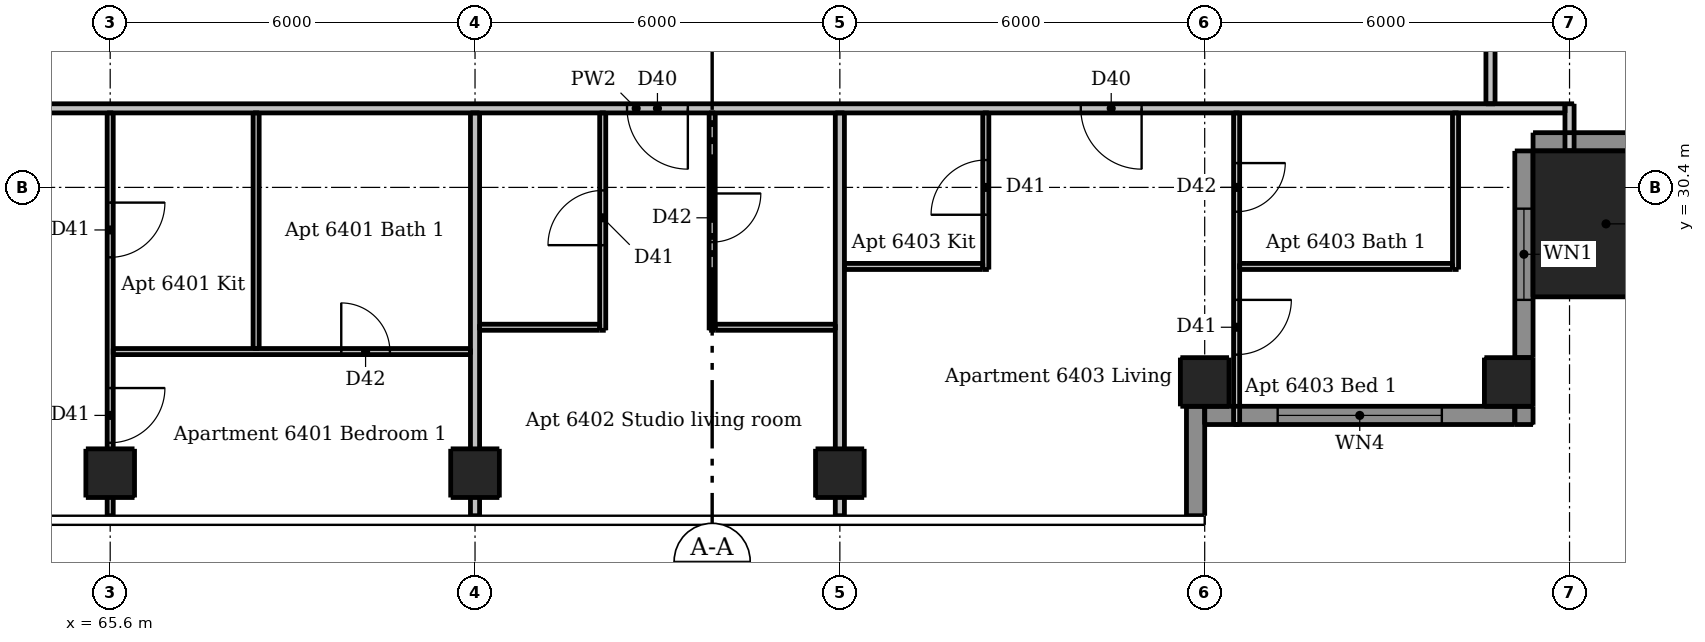
"""IFC4 building model, lengths in metres.
Left out: names, types, materials, properties, quantities, classifications, styles, units other than length and angle.
Written with IfcOpenShell. Run it as: python <this file> out.ifc"""

import sys

from ifc_helpers import new_model, si_unit, direction, frame, frame_2d, origin, origin_2d, place, context, subcontext, project, spatial, rectangle, extrude, element, fill, save


model = new_model("IFC4")
c1 = context("Model", 3, precision=1e-05, world=origin(), true_north=direction((0.0, 1.0)))
c2 = subcontext(c1, "Body", "Model", "MODEL_VIEW")
j1 = project(units=[si_unit("LENGTHUNIT", "METRE"), si_unit("PLANEANGLEUNIT", "RADIAN")], contexts=[c1])
p1 = place(None, origin())
s1 = spatial("IfcSite", under=j1, at=p1, CompositionType="ELEMENT")
p2 = place(p1, origin())
s2 = spatial("IfcBuilding", under=s1, at=p2, CompositionType="ELEMENT")
p3 = place(p2, frame((0.0, 0.0, 242.2)))
s3 = spatial("IfcBuildingStorey", under=s2, at=p3, CompositionType="ELEMENT", Elevation=242.2)
for number, where, z_axis, x_axis in (
    (1, (65.6, 25.7, 0.0), (0.0, 0.0, 1.0), (1.0, 0.0, 0.0)),
    (2, (71.6, 25.7, 0.0), (0.0, 0.0, 1.0), (1.0, 0.0, 0.0)),
    (3, (77.6, 25.7, 0.0), (0.0, 0.0, 1.0), (1.0, 0.0, 0.0)),
    (4, (83.6, 27.2, 0.0), (0.0, 0.0, 1.0), (1.0, 0.0, 0.0)),
    (5, (88.6, 27.2, 0.0), (0.0, 0.0, 1.0), (1.0, 0.0, 0.0)),
):
    element("IfcColumn", number, at=place(p3, frame(where, z_axis=z_axis, x_axis=x_axis)), inside=s3, PredefinedType="COLUMN", context=c2, shape_type="SweptSolid", body=[
        extrude(rectangle(XDim=0.8, YDim=0.8, at=origin_2d()), origin(), (0.0, 0.0, 1.0), 3.05),
    ])
p4 = place(p3, frame((90.2, 29.8, 0.0), z_axis=(0.0, 0.0, 1.0), x_axis=(1.0, 0.0, 0.0)))
e6 = element("IfcColumn", 6, at=p4, inside=s3, PredefinedType="COLUMN", context=c2, shape_type="SweptSolid", body=[
    extrude(rectangle(XDim=2.4, YDim=2.4, at=origin_2d()), origin(), (0.0, 0.0, 1.0), 3.3),
])
p5 = place(p3, frame((83.45, 25.0, 0.0), z_axis=(0.0, 0.0, 1.0), x_axis=(0.0, 1.0, 0.0)))
e7 = element("IfcWall", 7, at=p5, inside=s3, PredefinedType="SOLIDWALL", context=c2, shape_type="SweptSolid", body=[
    extrude(rectangle(XDim=1.8, YDim=0.3, at=frame_2d((0.9, 0.0))), origin(), (0.0, 0.0, 1.0), 3.05),
])
p6 = place(p3, frame((88.85, 26.5, 0.0), z_axis=(0.0, 0.0, 1.0), x_axis=(0.0, 1.0, 0.0)))
e8 = element("IfcWall", 8, at=p6, inside=s3, PredefinedType="SOLIDWALL", context=c2, shape_type="SweptSolid", body=[
    extrude(rectangle(XDim=0.3, YDim=0.3, at=frame_2d((0.15, 0.0))), origin(), (0.0, 0.0, 1.0), 3.05),
])
p7 = place(p3, frame((88.85, 27.6, 0.0), z_axis=(0.0, 0.0, 1.0), x_axis=(0.0, 1.0, 0.0)))
e9 = element("IfcWall", 9, at=p7, inside=s3, PredefinedType="SOLIDWALL", context=c2, shape_type="SweptSolid", body=[
    extrude(rectangle(XDim=3.4, YDim=0.3, at=frame_2d((1.7, 0.0))), origin(), (0.0, 0.0, 1.0), 3.05),
])
p8 = place(p7, frame((0.95, 0.0, 0.9)))
e10 = element("IfcOpeningElement", 10, at=p8, cuts=e9, PredefinedType="OPENING", context=c2, shape_type="SweptSolid", body=[
    extrude(rectangle(XDim=1.5, YDim=1.5, at=frame_2d((0.75, 0.75))), frame((0.0, 0.16, 0.0), z_axis=(0.0, -1.0, 0.0), x_axis=(1.0, 0.0, 0.0)), (0.0, 0.0, 1.0), 0.32),
])
p9 = place(p3, frame((89.0, 31.15, 0.0), z_axis=(0.0, 0.0, 1.0), x_axis=(1.0, 0.0, 0.0)))
e11 = element("IfcWall", 11, at=p9, inside=s3, PredefinedType="SOLIDWALL", context=c2, shape_type="SweptSolid", body=[
    extrude(rectangle(XDim=3.4, YDim=0.3, at=frame_2d((1.7, 0.0))), origin(), (0.0, 0.0, 1.0), 3.05),
])
p10 = place(p3, frame((83.6, 26.65, 0.0), z_axis=(0.0, 0.0, 1.0), x_axis=(1.0, 0.0, 0.0)))
e12 = element("IfcWall", 12, at=p10, inside=s3, PredefinedType="SOLIDWALL", context=c2, shape_type="SweptSolid", body=[
    extrude(rectangle(XDim=5.1, YDim=0.3, at=frame_2d((2.55, 0.0))), origin(), (0.0, 0.0, 1.0), 3.05),
])
p11 = place(p10, frame((1.2, 0.0, 0.15)))
e13 = element("IfcOpeningElement", 13, at=p11, cuts=e12, PredefinedType="OPENING", context=c2, shape_type="SweptSolid", body=[
    extrude(rectangle(XDim=2.7, YDim=2.1, at=frame_2d((1.35, 1.05))), frame((0.0, 0.16, 0.0), z_axis=(0.0, -1.0, 0.0), x_axis=(1.0, 0.0, 0.0)), (0.0, 0.0, 1.0), 0.32),
])
p12 = place(p3, frame((65.6, 31.625, 0.0), z_axis=(0.0, 0.0, 1.0), x_axis=(0.0, -1.0, 0.0)))
e14 = element("IfcWall", 14, at=p12, inside=s3, PredefinedType="PARTITIONING", context=c2, shape_type="SweptSolid", body=[
    extrude(rectangle(XDim=6.625, YDim=0.1, at=frame_2d((3.312, 0.0))), origin(), (0.0, 0.0, 1.0), 2.59),
])
p13 = place(p12, frame((1.475, 0.0, 0.0)))
e15 = element("IfcOpeningElement", 15, at=p13, cuts=e14, PredefinedType="OPENING", context=c2, shape_type="SweptSolid", body=[
    extrude(rectangle(XDim=0.9, YDim=2.1, at=frame_2d((0.45, 1.05))), frame((0.0, 0.06, 0.0), z_axis=(0.0, -1.0, 0.0), x_axis=(1.0, 0.0, 0.0)), (0.0, 0.0, 1.0), 0.12),
])
p14 = place(p12, frame((4.525, 0.0, 0.0)))
e16 = element("IfcOpeningElement", 16, at=p14, cuts=e14, PredefinedType="OPENING", context=c2, shape_type="SweptSolid", body=[
    extrude(rectangle(XDim=0.9, YDim=2.1, at=frame_2d((0.45, 1.05))), frame((0.0, 0.06, 0.0), z_axis=(0.0, -1.0, 0.0), x_axis=(1.0, 0.0, 0.0)), (0.0, 0.0, 1.0), 0.12),
])
p15 = place(p3, frame((68.0, 27.75, 0.0), z_axis=(0.0, 0.0, 1.0), x_axis=(0.0, 1.0, 0.0)))
e17 = element("IfcWall", 17, at=p15, inside=s3, PredefinedType="PARTITIONING", context=c2, shape_type="SweptSolid", body=[
    extrude(rectangle(XDim=3.875, YDim=0.1, at=frame_2d((1.938, 0.0))), origin(), (0.0, 0.0, 1.0), 3.05),
])
p16 = place(p3, frame((73.7, 28.05, 0.0), z_axis=(0.0, 0.0, 1.0), x_axis=(0.0, 1.0, 0.0)))
e18 = element("IfcWall", 18, at=p16, inside=s3, PredefinedType="PARTITIONING", context=c2, shape_type="SweptSolid", body=[
    extrude(rectangle(XDim=3.575, YDim=0.1, at=frame_2d((1.788, 0.0))), origin(), (0.0, 0.0, 1.0), 3.05),
])
p17 = place(p16, frame((1.4, 0.0, 0.0)))
e19 = element("IfcOpeningElement", 19, at=p17, cuts=e18, PredefinedType="OPENING", context=c2, shape_type="SweptSolid", body=[
    extrude(rectangle(XDim=0.9, YDim=2.1, at=frame_2d((0.45, 1.05))), frame((0.0, 0.06, 0.0), z_axis=(0.0, -1.0, 0.0), x_axis=(1.0, 0.0, 0.0)), (0.0, 0.0, 1.0), 0.12),
])
p18 = place(p3, frame((75.5, 31.625, 0.0), z_axis=(0.0, 0.0, 1.0), x_axis=(0.0, -1.0, 0.0)))
e20 = element("IfcWall", 20, at=p18, inside=s3, PredefinedType="PARTITIONING", context=c2, shape_type="SweptSolid", body=[
    extrude(rectangle(XDim=3.575, YDim=0.1, at=frame_2d((1.788, 0.0))), origin(), (0.0, 0.0, 1.0), 3.05),
])
p19 = place(p18, frame((1.325, 0.0, 0.0)))
e21 = element("IfcOpeningElement", 21, at=p19, cuts=e20, PredefinedType="OPENING", context=c2, shape_type="SweptSolid", body=[
    extrude(rectangle(XDim=0.8, YDim=2.1, at=frame_2d((0.4, 1.05))), frame((0.0, 0.06, 0.0), z_axis=(0.0, -1.0, 0.0), x_axis=(1.0, 0.0, 0.0)), (0.0, 0.0, 1.0), 0.12),
])
p20 = place(p3, frame((80.0, 29.05, 0.0), z_axis=(0.0, 0.0, 1.0), x_axis=(0.0, 1.0, 0.0)))
e22 = element("IfcWall", 22, at=p20, inside=s3, PredefinedType="PARTITIONING", context=c2, shape_type="SweptSolid", body=[
    extrude(rectangle(XDim=2.575, YDim=0.1, at=frame_2d((1.288, 0.0))), origin(), (0.0, 0.0, 1.0), 3.05),
])
p21 = place(p20, frame((0.9, 0.0, 0.0)))
e23 = element("IfcOpeningElement", 23, at=p21, cuts=e22, PredefinedType="OPENING", context=c2, shape_type="SweptSolid", body=[
    extrude(rectangle(XDim=0.9, YDim=2.1, at=frame_2d((0.45, 1.05))), frame((0.0, 0.06, 0.0), z_axis=(0.0, -1.0, 0.0), x_axis=(1.0, 0.0, 0.0)), (0.0, 0.0, 1.0), 0.12),
])
p22 = place(p3, frame((84.125, 31.625, 0.0), z_axis=(0.0, 0.0, 1.0), x_axis=(0.0, -1.0, 0.0)))
e24 = element("IfcWall", 24, at=p22, inside=s3, PredefinedType="PARTITIONING", context=c2, shape_type="SweptSolid", body=[
    extrude(rectangle(XDim=5.125, YDim=0.1, at=frame_2d((2.562, 0.0))), origin(), (0.0, 0.0, 1.0), 3.05),
])
p23 = place(p22, frame((3.075, 0.0, 0.0)))
e25 = element("IfcOpeningElement", 25, at=p23, cuts=e24, PredefinedType="OPENING", context=c2, shape_type="SweptSolid", body=[
    extrude(rectangle(XDim=0.9, YDim=2.1, at=frame_2d((0.45, 1.05))), frame((0.0, 0.06, 0.0), z_axis=(0.0, -1.0, 0.0), x_axis=(1.0, 0.0, 0.0)), (0.0, 0.0, 1.0), 0.12),
])
p24 = place(p22, frame((0.825, 0.0, 0.0)))
e26 = element("IfcOpeningElement", 26, at=p24, cuts=e24, PredefinedType="OPENING", context=c2, shape_type="SweptSolid", body=[
    extrude(rectangle(XDim=0.8, YDim=2.1, at=frame_2d((0.4, 1.05))), frame((0.0, 0.06, 0.0), z_axis=(0.0, -1.0, 0.0), x_axis=(1.0, 0.0, 0.0)), (0.0, 0.0, 1.0), 0.12),
])
p25 = place(p3, frame((87.725, 29.05, 0.0), z_axis=(0.0, 0.0, 1.0), x_axis=(0.0, 1.0, 0.0)))
e27 = element("IfcWall", 27, at=p25, inside=s3, PredefinedType="PARTITIONING", context=c2, shape_type="SweptSolid", body=[
    extrude(rectangle(XDim=2.575, YDim=0.1, at=frame_2d((1.288, 0.0))), origin(), (0.0, 0.0, 1.0), 3.05),
])
p26 = place(p3, frame((77.675, 29.1, 0.0), z_axis=(0.0, 0.0, 1.0), x_axis=(1.0, 0.0, 0.0)))
e28 = element("IfcWall", 28, at=p26, inside=s3, PredefinedType="PARTITIONING", context=c2, shape_type="SweptSolid", body=[
    extrude(rectangle(XDim=2.275, YDim=0.1, at=frame_2d((1.137, 0.0))), origin(), (0.0, 0.0, 1.0), 3.05),
])
p27 = place(p3, frame((84.175, 29.1, 0.0), z_axis=(0.0, 0.0, 1.0), x_axis=(1.0, 0.0, 0.0)))
e29 = element("IfcWall", 29, at=p27, inside=s3, PredefinedType="PARTITIONING", context=c2, shape_type="SweptSolid", body=[
    extrude(rectangle(XDim=3.5, YDim=0.1, at=frame_2d((1.75, 0.0))), origin(), (0.0, 0.0, 1.0), 3.05),
])
for number, where, z_axis, x_axis in (
    (30, (71.675, 28.1, 0.0), (0.0, 0.0, 1.0), (1.0, 0.0, 0.0)),
    (31, (75.55, 28.1, 0.0), (0.0, 0.0, 1.0), (1.0, 0.0, 0.0)),
):
    element("IfcWall", number, at=place(p3, frame(where, z_axis=z_axis, x_axis=x_axis)), inside=s3, PredefinedType="PARTITIONING", context=c2, shape_type="SweptSolid", body=[
        extrude(rectangle(XDim=1.975, YDim=0.1, at=frame_2d((0.987, 0.0))), origin(), (0.0, 0.0, 1.0), 3.05),
    ])
p28 = place(p3, frame((65.65, 27.7, 0.0), z_axis=(0.0, 0.0, 1.0), x_axis=(1.0, 0.0, 0.0)))
e32 = element("IfcWall", 32, at=p28, inside=s3, PredefinedType="PARTITIONING", context=c2, shape_type="SweptSolid", body=[
    extrude(rectangle(XDim=5.875, YDim=0.1, at=frame_2d((2.938, 0.0))), origin(), (0.0, 0.0, 1.0), 3.05),
])
p29 = place(p28, frame((3.75, 0.0, 0.0)))
e33 = element("IfcOpeningElement", 33, at=p29, cuts=e32, PredefinedType="OPENING", context=c2, shape_type="SweptSolid", body=[
    extrude(rectangle(XDim=0.8, YDim=2.1, at=frame_2d((0.4, 1.05))), frame((0.0, 0.06, 0.0), z_axis=(0.0, -1.0, 0.0), x_axis=(1.0, 0.0, 0.0)), (0.0, 0.0, 1.0), 0.12),
])
for number, where, z_axis, x_axis in (
    (34, (71.6, 25.0, 0.0), (0.0, 0.0, 1.0), (0.0, 1.0, 0.0)),
    (35, (77.6, 25.0, 0.0), (0.0, 0.0, 1.0), (0.0, 1.0, 0.0)),
):
    element("IfcWall", number, at=place(p3, frame(where, z_axis=z_axis, x_axis=x_axis)), inside=s3, PredefinedType="PARTITIONING", context=c2, shape_type="SweptSolid", body=[
        extrude(rectangle(XDim=6.625, YDim=0.15, at=frame_2d((3.312, 0.0))), origin(), (0.0, 0.0, 1.0), 2.59),
    ])
p30 = place(p3, frame((88.3, 61.175, 0.0), z_axis=(0.0, 0.0, 1.0), x_axis=(0.0, -1.0, 0.0)))
e36 = element("IfcWall", 36, at=p30, inside=s3, PredefinedType="PARTITIONING", context=c2, shape_type="SweptSolid", body=[
    extrude(rectangle(XDim=29.4, YDim=0.15, at=frame_2d((14.7, 0.0))), origin(), (0.0, 0.0, 1.0), 3.05),
])
p31 = place(p30, frame((26.625, 0.0, 0.0)))
e37 = element("IfcOpeningElement", 37, at=p31, cuts=e36, PredefinedType="OPENING", context=c2, shape_type="SweptSolid", body=[
    extrude(rectangle(XDim=1.0, YDim=2.1, at=frame_2d((0.5, 1.05))), frame((0.0, 0.085, 0.0), z_axis=(0.0, -1.0, 0.0), x_axis=(1.0, 0.0, 0.0)), (0.0, 0.0, 1.0), 0.17),
])
p32 = place(p30, frame((15.275, 0.0, 0.0)))
e38 = element("IfcOpeningElement", 38, at=p32, cuts=e36, PredefinedType="OPENING", context=c2, shape_type="SweptSolid", body=[
    extrude(rectangle(XDim=1.0, YDim=2.1, at=frame_2d((0.5, 1.05))), frame((0.0, 0.085, 0.0), z_axis=(0.0, -1.0, 0.0), x_axis=(1.0, 0.0, 0.0)), (0.0, 0.0, 1.0), 0.17),
])
p33 = place(p30, frame((9.275, 0.0, 0.0)))
e39 = element("IfcOpeningElement", 39, at=p33, cuts=e36, PredefinedType="OPENING", context=c2, shape_type="SweptSolid", body=[
    extrude(rectangle(XDim=1.0, YDim=2.1, at=frame_2d((0.5, 1.05))), frame((0.0, 0.085, 0.0), z_axis=(0.0, -1.0, 0.0), x_axis=(1.0, 0.0, 0.0)), (0.0, 0.0, 1.0), 0.17),
])
p34 = place(p30, frame((3.275, 0.0, 0.0)))
e40 = element("IfcOpeningElement", 40, at=p34, cuts=e36, PredefinedType="OPENING", context=c2, shape_type="SweptSolid", body=[
    extrude(rectangle(XDim=1.0, YDim=2.1, at=frame_2d((0.5, 1.05))), frame((0.0, 0.085, 0.0), z_axis=(0.0, -1.0, 0.0), x_axis=(1.0, 0.0, 0.0)), (0.0, 0.0, 1.0), 0.17),
])
p35 = place(p3, frame((89.6, 31.0, 0.0), z_axis=(0.0, 0.0, 1.0), x_axis=(0.0, 1.0, 0.0)))
e41 = element("IfcWall", 41, at=p35, inside=s3, PredefinedType="PARTITIONING", context=c2, shape_type="SweptSolid", body=[
    extrude(rectangle(XDim=0.775, YDim=0.15, at=frame_2d((0.387, 0.0))), origin(), (0.0, 0.0, 1.0), 3.05),
])
p36 = place(p3, frame((89.525, 31.7, 0.0), z_axis=(0.0, 0.0, 1.0), x_axis=(-1.0, 0.0, 0.0)))
e42 = element("IfcWall", 42, at=p36, inside=s3, PredefinedType="PARTITIONING", context=c2, shape_type="SweptSolid", body=[
    extrude(rectangle(XDim=30.55, YDim=0.15, at=frame_2d((15.275, 0.0))), origin(), (0.0, 0.0, 1.0), 3.05),
])
p37 = place(p36, frame((26.775, 0.0, 0.0)))
e43 = element("IfcOpeningElement", 43, at=p37, cuts=e42, PredefinedType="OPENING", context=c2, shape_type="SweptSolid", body=[
    extrude(rectangle(XDim=1.0, YDim=2.1, at=frame_2d((0.5, 1.05))), frame((0.0, 0.085, 0.0), z_axis=(0.0, -1.0, 0.0), x_axis=(1.0, 0.0, 0.0)), (0.0, 0.0, 1.0), 0.17),
])
p38 = place(p36, frame((14.425, 0.0, 0.0)))
e44 = element("IfcOpeningElement", 44, at=p38, cuts=e42, PredefinedType="OPENING", context=c2, shape_type="SweptSolid", body=[
    extrude(rectangle(XDim=1.0, YDim=2.1, at=frame_2d((0.5, 1.05))), frame((0.0, 0.085, 0.0), z_axis=(0.0, -1.0, 0.0), x_axis=(1.0, 0.0, 0.0)), (0.0, 0.0, 1.0), 0.17),
])
p39 = place(p36, frame((6.962, 0.0, 0.0)))
e45 = element("IfcOpeningElement", 45, at=p39, cuts=e42, PredefinedType="OPENING", context=c2, shape_type="SweptSolid", body=[
    extrude(rectangle(XDim=1.0, YDim=2.1, at=frame_2d((0.5, 1.05))), frame((0.0, 0.085, 0.0), z_axis=(0.0, -1.0, 0.0), x_axis=(1.0, 0.0, 0.0)), (0.0, 0.0, 1.0), 0.17),
])
p40 = place(p8, origin())
e46 = element("IfcWindow", 46, at=p40, inside=s3, PartitioningType="DOUBLE_PANEL_VERTICAL", PredefinedType="WINDOW", context=c2, shape_type="SweptSolid", body=[
    extrude(rectangle(XDim=1.5, YDim=1.5, at=frame_2d((0.75, 0.75))), frame((0.0, 0.03, 0.0), z_axis=(0.0, -1.0, 0.0), x_axis=(1.0, 0.0, 0.0)), (0.0, 0.0, 1.0), 0.06),
])
fill(e10, e46)
p41 = place(p11, origin())
e47 = element("IfcWindow", 47, at=p41, inside=s3, PartitioningType="DOUBLE_PANEL_VERTICAL", PredefinedType="WINDOW", context=c2, shape_type="SweptSolid", body=[
    extrude(rectangle(XDim=2.7, YDim=2.1, at=frame_2d((1.35, 1.05))), frame((0.0, 0.03, 0.0), z_axis=(0.0, -1.0, 0.0), x_axis=(1.0, 0.0, 0.0)), (0.0, 0.0, 1.0), 0.06),
])
fill(e13, e47)
p42 = place(p13, origin())
e48 = element("IfcDoor", 48, at=p42, inside=s3, OperationType="SINGLE_SWING_LEFT", PredefinedType="DOOR", context=c2, shape_type="SweptSolid", body=[
    extrude(rectangle(XDim=0.9, YDim=2.1, at=frame_2d((0.45, 1.05))), frame((0.0, 0.025, 0.0), z_axis=(0.0, -1.0, 0.0), x_axis=(1.0, 0.0, 0.0)), (0.0, 0.0, 1.0), 0.05),
])
fill(e15, e48)
p43 = place(p14, origin())
e49 = element("IfcDoor", 49, at=p43, inside=s3, OperationType="SINGLE_SWING_LEFT", PredefinedType="DOOR", context=c2, shape_type="SweptSolid", body=[
    extrude(rectangle(XDim=0.9, YDim=2.1, at=frame_2d((0.45, 1.05))), frame((0.0, 0.025, 0.0), z_axis=(0.0, -1.0, 0.0), x_axis=(1.0, 0.0, 0.0)), (0.0, 0.0, 1.0), 0.05),
])
fill(e16, e49)
p44 = place(p29, origin())
e50 = element("IfcDoor", 50, at=p44, inside=s3, OperationType="SINGLE_SWING_LEFT", PredefinedType="DOOR", context=c2, shape_type="SweptSolid", body=[
    extrude(rectangle(XDim=0.8, YDim=2.1, at=frame_2d((0.4, 1.05))), frame((0.0, 0.025, 0.0), z_axis=(0.0, -1.0, 0.0), x_axis=(1.0, 0.0, 0.0)), (0.0, 0.0, 1.0), 0.05),
])
fill(e33, e50)
p45 = place(p38, origin())
e51 = element("IfcDoor", 51, at=p45, inside=s3, OperationType="SINGLE_SWING_LEFT", PredefinedType="DOOR", context=c2, shape_type="SweptSolid", body=[
    extrude(rectangle(XDim=1.0, YDim=2.1, at=frame_2d((0.5, 1.05))), frame((0.0, 0.025, 0.0), z_axis=(0.0, -1.0, 0.0), x_axis=(1.0, 0.0, 0.0)), (0.0, 0.0, 1.0), 0.05),
])
fill(e44, e51)
p46 = place(p17, origin())
e52 = element("IfcDoor", 52, at=p46, inside=s3, OperationType="SINGLE_SWING_LEFT", PredefinedType="DOOR", context=c2, shape_type="SweptSolid", body=[
    extrude(rectangle(XDim=0.9, YDim=2.1, at=frame_2d((0.45, 1.05))), frame((0.0, 0.025, 0.0), z_axis=(0.0, -1.0, 0.0), x_axis=(1.0, 0.0, 0.0)), (0.0, 0.0, 1.0), 0.05),
])
fill(e19, e52)
p47 = place(p19, origin())
e53 = element("IfcDoor", 53, at=p47, inside=s3, OperationType="SINGLE_SWING_LEFT", PredefinedType="DOOR", context=c2, shape_type="SweptSolid", body=[
    extrude(rectangle(XDim=0.8, YDim=2.1, at=frame_2d((0.4, 1.05))), frame((0.0, 0.025, 0.0), z_axis=(0.0, -1.0, 0.0), x_axis=(1.0, 0.0, 0.0)), (0.0, 0.0, 1.0), 0.05),
])
fill(e21, e53)
p48 = place(p39, origin())
e54 = element("IfcDoor", 54, at=p48, inside=s3, OperationType="SINGLE_SWING_LEFT", PredefinedType="DOOR", context=c2, shape_type="SweptSolid", body=[
    extrude(rectangle(XDim=1.0, YDim=2.1, at=frame_2d((0.5, 1.05))), frame((0.0, 0.025, 0.0), z_axis=(0.0, -1.0, 0.0), x_axis=(1.0, 0.0, 0.0)), (0.0, 0.0, 1.0), 0.05),
])
fill(e45, e54)
p49 = place(p21, origin())
e55 = element("IfcDoor", 55, at=p49, inside=s3, OperationType="SINGLE_SWING_LEFT", PredefinedType="DOOR", context=c2, shape_type="SweptSolid", body=[
    extrude(rectangle(XDim=0.9, YDim=2.1, at=frame_2d((0.45, 1.05))), frame((0.0, 0.025, 0.0), z_axis=(0.0, -1.0, 0.0), x_axis=(1.0, 0.0, 0.0)), (0.0, 0.0, 1.0), 0.05),
])
fill(e23, e55)
p50 = place(p23, origin())
e56 = element("IfcDoor", 56, at=p50, inside=s3, OperationType="SINGLE_SWING_LEFT", PredefinedType="DOOR", context=c2, shape_type="SweptSolid", body=[
    extrude(rectangle(XDim=0.9, YDim=2.1, at=frame_2d((0.45, 1.05))), frame((0.0, 0.025, 0.0), z_axis=(0.0, -1.0, 0.0), x_axis=(1.0, 0.0, 0.0)), (0.0, 0.0, 1.0), 0.05),
])
fill(e25, e56)
p51 = place(p24, origin())
e57 = element("IfcDoor", 57, at=p51, inside=s3, OperationType="SINGLE_SWING_LEFT", PredefinedType="DOOR", context=c2, shape_type="SweptSolid", body=[
    extrude(rectangle(XDim=0.8, YDim=2.1, at=frame_2d((0.4, 1.05))), frame((0.0, 0.025, 0.0), z_axis=(0.0, -1.0, 0.0), x_axis=(1.0, 0.0, 0.0)), (0.0, 0.0, 1.0), 0.05),
])
fill(e26, e57)
save(model, sys.argv[1])
